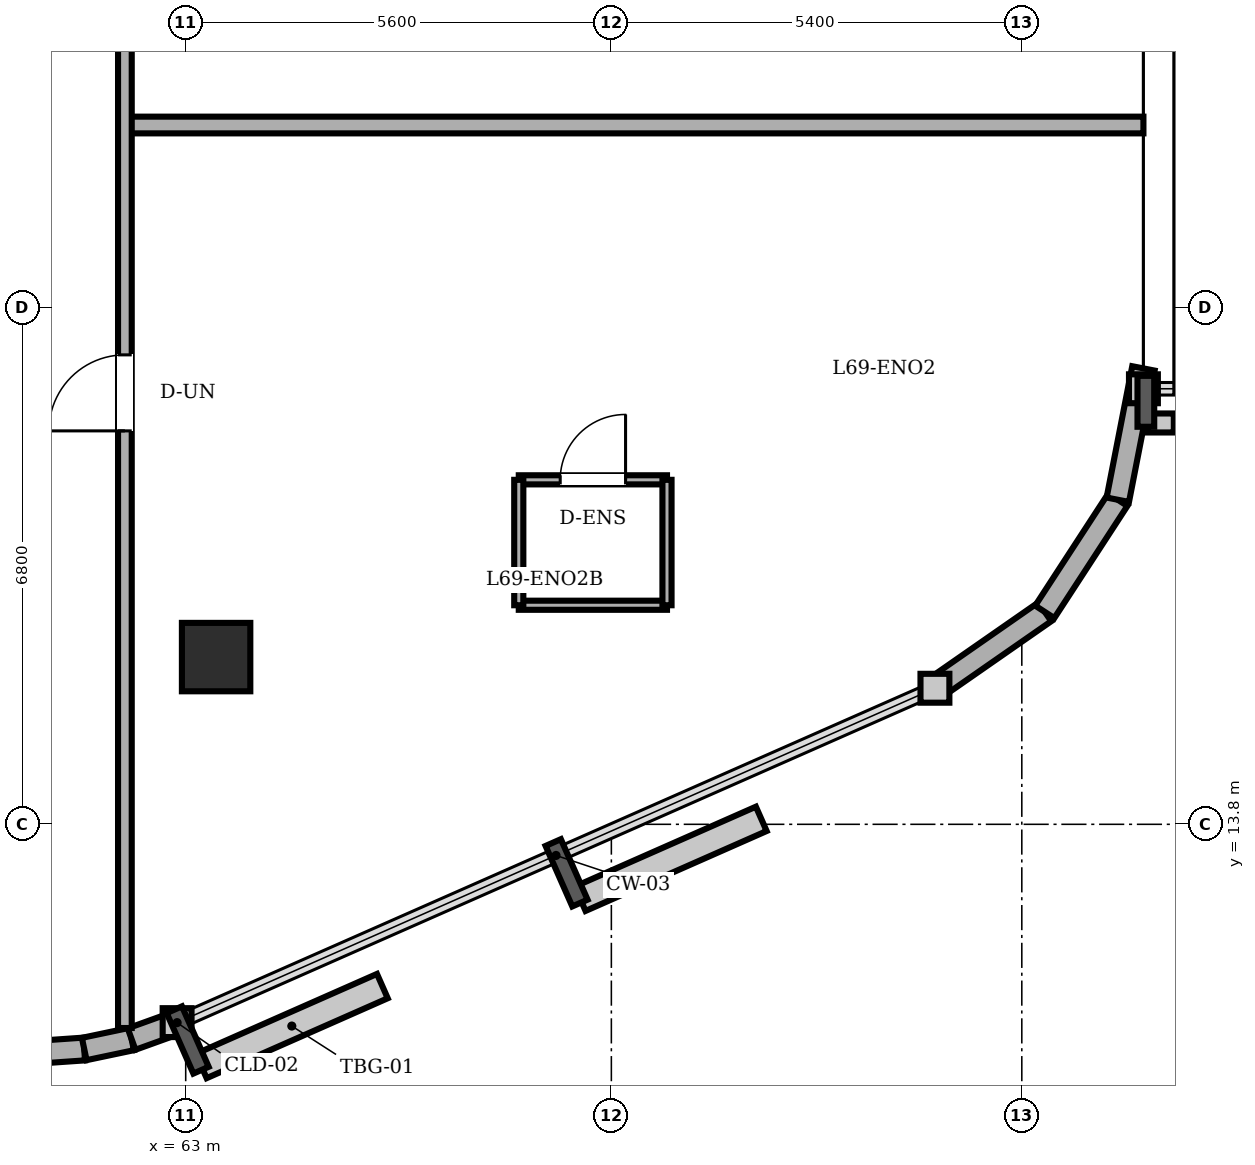
"""IFC4 building model, lengths in metres.
Left out: names, types, materials, properties, quantities, classifications, styles, units other than length and angle.
Written with IfcOpenShell. Run it as: python <this file> out.ifc"""

import sys

from ifc_helpers import new_model, si_unit, direction, frame, frame_2d, origin, origin_2d, place, context, subcontext, project, spatial, rectangle, circle, extrude, element, fill, save


model = new_model("IFC4")
c1 = context("Model", 3, precision=1e-05, world=origin(), true_north=direction((0.0, 1.0)))
c2 = subcontext(c1, "Body", "Model", "MODEL_VIEW")
j1 = project(units=[si_unit("LENGTHUNIT", "METRE"), si_unit("PLANEANGLEUNIT", "RADIAN")], contexts=[c1])
p1 = place(None, origin())
s1 = spatial("IfcSite", under=j1, at=p1, CompositionType="ELEMENT")
p2 = place(p1, origin())
s2 = spatial("IfcBuilding", under=s1, at=p2, CompositionType="ELEMENT")
p3 = place(p2, frame((0.0, 0.0, 266.1)))
s3 = spatial("IfcBuildingStorey", under=s2, at=p3, CompositionType="ELEMENT", Elevation=266.1)
p4 = place(p3, frame((63.4, 16.0, 0.0), z_axis=(0.0, 0.0, 1.0), x_axis=(1.0, 0.0, 0.0)))
e1 = element("IfcColumn", 1, at=p4, inside=s3, PredefinedType="COLUMN", context=c2, shape_type="SweptSolid", body=[
    extrude(circle(Radius=0.45, at=origin_2d()), origin(), (0.0, 0.0, 1.0), 3.65),
])
p5 = place(p3, frame((61.03, 10.8, 0.0), z_axis=(0.0, 0.0, 1.0), x_axis=(0.997613959688, 0.069039028352, 0.0)))
e2 = element("IfcWall", 2, at=p5, inside=s3, PredefinedType="SOLIDWALL", context=c2, shape_type="SweptSolid", body=[
    extrude(rectangle(XDim=0.636, YDim=0.3, at=frame_2d((0.318, 0.0))), origin(), (0.0, 0.0, 1.0), 3.45),
])
p6 = place(p3, frame((61.665, 10.844, 0.0), z_axis=(0.0, 0.0, 1.0), x_axis=(0.97857012251, 0.205913854149, 0.0)))
e3 = element("IfcWall", 3, at=p6, inside=s3, PredefinedType="SOLIDWALL", context=c2, shape_type="SweptSolid", body=[
    extrude(rectangle(XDim=0.637, YDim=0.3, at=frame_2d((0.318, 0.0))), origin(), (0.0, 0.0, 1.0), 3.45),
])
p7 = place(p3, frame((62.288, 10.975, 0.0), z_axis=(0.0, 0.0, 1.0), x_axis=(0.94077491148, 0.339031806665, 0.0)))
e4 = element("IfcWall", 4, at=p7, inside=s3, PredefinedType="SOLIDWALL", context=c2, shape_type="SweptSolid", body=[
    extrude(rectangle(XDim=0.636, YDim=0.3, at=frame_2d((0.318, 0.0))), origin(), (0.0, 0.0, 1.0), 3.45),
])
p8 = place(p3, frame((72.857, 15.59, 0.0), z_axis=(0.0, 0.0, 1.0), x_axis=(0.821006966142, 0.570918174124, 0.0)))
e5 = element("IfcWall", 5, at=p8, inside=s3, PredefinedType="SOLIDWALL", context=c2, shape_type="SweptSolid", body=[
    extrude(rectangle(XDim=1.76, YDim=0.3, at=frame_2d((0.88, 0.0))), origin(), (0.0, 0.0, 1.0), 3.45),
])
for number, where, z_axis, x_axis in (
    (6, (74.302, 16.595, 0.0), (0.0, 0.0, 1.0), (0.546, 0.838, 0.0)),
    (7, (75.263, 18.07, 0.0), (0.0, 0.0, 1.0), (0.192, 0.981, 0.0)),
):
    element("IfcWall", number, at=place(p3, frame(where, z_axis=z_axis, x_axis=x_axis)), inside=s3, PredefinedType="SOLIDWALL", context=c2, shape_type="SweptSolid", body=[
        extrude(rectangle(XDim=1.76, YDim=0.3, at=frame_2d((0.88, 0.0))), origin(), (0.0, 0.0, 1.0), 3.45),
    ])
p9 = place(p3, frame((67.382, 18.332, 0.0), z_axis=(0.0, 0.0, 1.0), x_axis=(1.0, 0.0, 0.0)))
e8 = element("IfcWall", 8, at=p9, inside=s3, PredefinedType="PARTITIONING", context=c2, shape_type="SweptSolid", body=[
    extrude(rectangle(XDim=1.95, YDim=0.12, at=frame_2d((0.975, 0.0))), origin(), (0.0, 0.0, 1.0), 3.45),
])
p10 = place(p9, frame((0.545, 0.0, 0.0)))
e9 = element("IfcOpeningElement", 9, at=p10, cuts=e8, PredefinedType="OPENING", context=c2, shape_type="SweptSolid", body=[
    extrude(rectangle(XDim=0.86, YDim=2.1, at=frame_2d((0.43, 1.05))), frame((0.0, 0.07, 0.0), z_axis=(0.0, -1.0, 0.0), x_axis=(1.0, 0.0, 0.0)), (0.0, 0.0, 1.0), 0.14),
])
p11 = place(p3, frame((69.332, 16.682, 0.0), z_axis=(0.0, 0.0, 1.0), x_axis=(-1.0, 0.0, 0.0)))
e10 = element("IfcWall", 10, at=p11, inside=s3, PredefinedType="PARTITIONING", context=c2, shape_type="SweptSolid", body=[
    extrude(rectangle(XDim=1.95, YDim=0.12, at=frame_2d((0.975, 0.0))), origin(), (0.0, 0.0, 1.0), 3.45),
])
for number, where, z_axis, x_axis in (
    (11, (67.382, 18.332, 0.0), (0.0, 0.0, 1.0), (0.0, -1.0, 0.0)),
    (12, (69.332, 16.682, 0.0), (0.0, 0.0, 1.0), (0.0, 1.0, 0.0)),
):
    element("IfcWall", number, at=place(p3, frame(where, z_axis=z_axis, x_axis=x_axis)), inside=s3, PredefinedType="PARTITIONING", context=c2, shape_type="SweptSolid", body=[
        extrude(rectangle(XDim=1.65, YDim=0.12, at=frame_2d((0.825, 0.0))), origin(), (0.0, 0.0, 1.0), 3.45),
    ])
p12 = place(p3, frame((62.2, 23.0, 0.0), z_axis=(0.0, 0.0, 1.0), x_axis=(1.0, 0.0, 0.0)))
e13 = element("IfcWall", 13, at=p12, inside=s3, PredefinedType="PARTITIONING", context=c2, shape_type="SweptSolid", body=[
    extrude(rectangle(XDim=13.4, YDim=0.22, at=frame_2d((6.7, 0.0))), origin(), (0.0, 0.0, 1.0), 3.45),
])
p13 = place(p3, frame((62.2, 11.12, 0.0), z_axis=(0.0, 0.0, 1.0), x_axis=(0.0, 1.0, 0.0)))
e14 = element("IfcWall", 14, at=p13, inside=s3, PredefinedType="PARTITIONING", context=c2, shape_type="SweptSolid", body=[
    extrude(rectangle(XDim=19.23, YDim=0.18, at=frame_2d((9.615, 0.0))), origin(), (0.0, 0.0, 1.0), 3.45),
])
p14 = place(p13, frame((14.795, 0.0, 0.0)))
e15 = element("IfcOpeningElement", 15, at=p14, cuts=e14, PredefinedType="OPENING", context=c2, shape_type="SweptSolid", body=[
    extrude(rectangle(XDim=1.0, YDim=2.15, at=frame_2d((0.5, 1.075))), frame((0.0, 0.1, 0.0), z_axis=(0.0, -1.0, 0.0), x_axis=(1.0, 0.0, 0.0)), (0.0, 0.0, 1.0), 0.2),
])
p15 = place(p13, frame((7.856, 0.0, 0.0)))
e16 = element("IfcOpeningElement", 16, at=p15, cuts=e14, PredefinedType="OPENING", context=c2, shape_type="SweptSolid", body=[
    extrude(rectangle(XDim=1.0, YDim=2.15, at=frame_2d((0.5, 1.075))), frame((0.0, 0.1, 0.0), z_axis=(0.0, -1.0, 0.0), x_axis=(1.0, 0.0, 0.0)), (0.0, 0.0, 1.0), 0.2),
])
p16 = place(p10, origin())
e17 = element("IfcDoor", 17, at=p16, inside=s3, OperationType="SINGLE_SWING_RIGHT", PredefinedType="DOOR", context=c2, shape_type="SweptSolid", body=[
    extrude(rectangle(XDim=0.86, YDim=2.1, at=frame_2d((0.43, 1.05))), frame((0.0, 0.025, 0.0), z_axis=(0.0, -1.0, 0.0), x_axis=(1.0, 0.0, 0.0)), (0.0, 0.0, 1.0), 0.05),
])
fill(e9, e17)
p17 = place(p15, origin())
e18 = element("IfcDoor", 18, at=p17, inside=s3, OperationType="SINGLE_SWING_LEFT", PredefinedType="DOOR", context=c2, shape_type="SweptSolid", body=[
    extrude(rectangle(XDim=1.0, YDim=2.15, at=frame_2d((0.5, 1.075))), frame((0.0, 0.025, 0.0), z_axis=(0.0, -1.0, 0.0), x_axis=(1.0, 0.0, 0.0)), (0.0, 0.0, 1.0), 0.05),
])
fill(e16, e18)
save(model, sys.argv[1])
